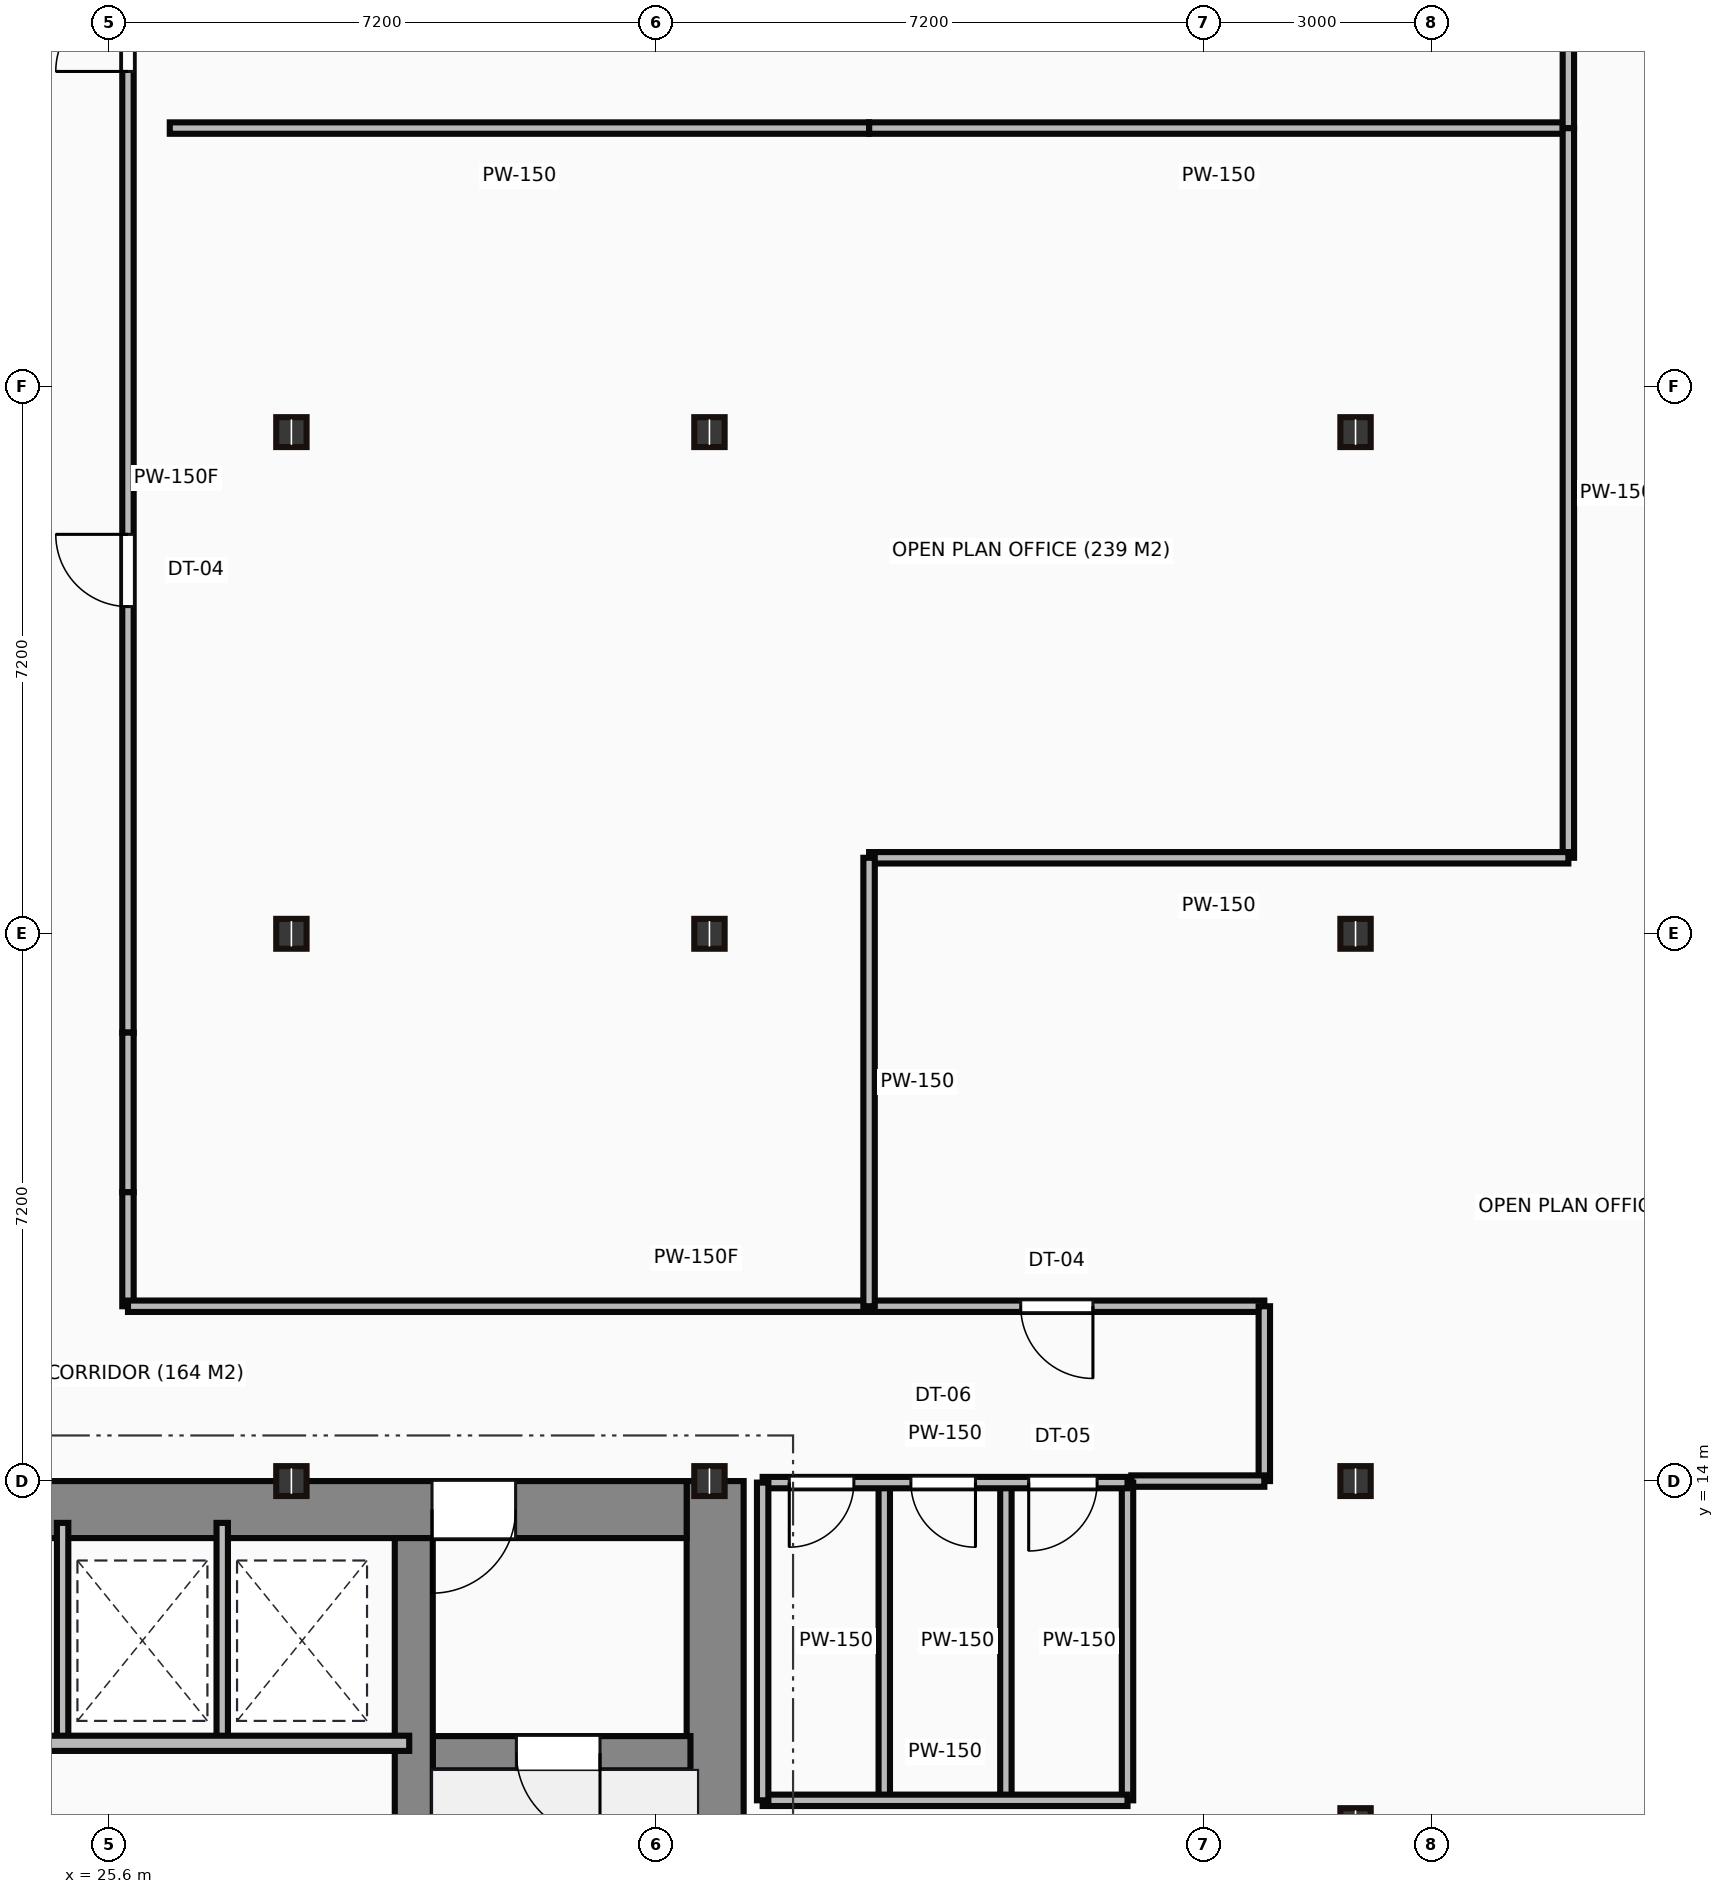
"""IFC4 building model, lengths in metres.
Left out: names, types, materials, properties, quantities, classifications, styles, units other than length and angle.
Written with IfcOpenShell. Run it as: python <this file> out.ifc"""

import sys

from ifc_helpers import new_model, si_unit, direction, frame, frame_2d, origin, origin_2d, place, context, subcontext, project, spatial, rectangle, i_section, extrude, source, transform, mapped, element, fill, save


model = new_model("IFC4")
c1 = context("Model", 3, precision=1e-05, world=origin(), true_north=direction((0.0, 1.0)))
c2 = subcontext(c1, "Body", "Model", "MODEL_VIEW")
j1 = project(units=[si_unit("LENGTHUNIT", "METRE"), si_unit("PLANEANGLEUNIT", "RADIAN")], contexts=[c1])
p1 = place(None, origin())
s1 = spatial("IfcSite", under=j1, at=p1, CompositionType="ELEMENT")
p2 = place(p1, origin())
s2 = spatial("IfcBuilding", under=s1, at=p2, CompositionType="ELEMENT")
p3 = place(p2, frame((0.0, 0.0, 132.45)))
s3 = spatial("IfcBuildingStorey", under=s2, at=p3, CompositionType="ELEMENT", Elevation=132.45)
m1 = source(origin(), c2, "Body", "SweptSolid", [
    extrude(rectangle(XDim=13.1, YDim=0.75, at=frame_2d((6.55, 0.0))), origin(), (0.0, 0.0, 1.0), 3.65),
])
p4 = place(p3, frame((33.575, 0.9, 0.0), z_axis=(0.0, 0.0, 1.0), x_axis=(0.0, 1.0, 0.0)))
e1 = element("IfcWall", 1, at=p4, inside=s3, PredefinedType="SHEAR", context=c2, shape_type="MappedRepresentation", body=[
    mapped(m1, transform((0.0, 0.0, 0.0))),
])
m2 = source(origin(), c2, "Body", "SweptSolid", [
    extrude(rectangle(XDim=12.6, YDim=0.75, at=frame_2d((6.3, 0.0))), origin(), (0.0, 0.0, 1.0), 3.65),
])
p5 = place(p3, frame((20.6, 13.625, 0.0), z_axis=(0.0, 0.0, 1.0), x_axis=(1.0, 0.0, 0.0)))
e2 = element("IfcWall", 2, at=p5, inside=s3, PredefinedType="SHEAR", context=c2, shape_type="MappedRepresentation", body=[
    mapped(m2, transform((0.0, 0.0, 0.0))),
])
p6 = place(p5, frame((9.25, 0.0, 0.0)))
e3 = element("IfcOpeningElement", 3, at=p6, cuts=e2, PredefinedType="OPENING", context=c2, shape_type="SweptSolid", body=[
    extrude(rectangle(XDim=1.1, YDim=2.15, at=frame_2d((0.55, 1.075))), frame((0.0, 0.385, 0.0), z_axis=(0.0, -1.0, 0.0), x_axis=(1.0, 0.0, 0.0)), (0.0, 0.0, 1.0), 0.77),
])
m3 = source(origin(), c2, "Body", "SweptSolid", [
    extrude(rectangle(XDim=12.35, YDim=0.5, at=frame_2d((6.175, 0.0))), origin(), (0.0, 0.0, 1.0), 3.65),
])
p7 = place(p3, frame((29.61, 0.9, 0.0), z_axis=(0.0, 0.0, 1.0), x_axis=(0.0, 1.0, 0.0)))
e4 = element("IfcWall", 4, at=p7, inside=s3, PredefinedType="SHEAR", context=c2, shape_type="MappedRepresentation", body=[
    mapped(m3, transform((0.0, 0.0, 0.0))),
])
m4 = source(origin(), c2, "Body", "SweptSolid", [
    extrude(rectangle(XDim=3.39, YDim=0.45, at=frame_2d((1.695, 0.0))), origin(), (0.0, 0.0, 1.0), 3.65),
])
p8 = place(p3, frame((29.86, 10.42, 0.0), z_axis=(0.0, 0.0, 1.0), x_axis=(1.0, 0.0, 0.0)))
e5 = element("IfcWall", 5, at=p8, inside=s3, PredefinedType="SHEAR", context=c2, shape_type="MappedRepresentation", body=[
    mapped(m4, transform((0.0, 0.0, 0.0))),
])
p9 = place(p8, frame((1.1, 0.0, 0.0)))
e6 = element("IfcOpeningElement", 6, at=p9, cuts=e5, PredefinedType="OPENING", context=c2, shape_type="SweptSolid", body=[
    extrude(rectangle(XDim=1.1, YDim=2.15, at=frame_2d((0.55, 1.075))), frame((0.0, 0.235, 0.0), z_axis=(0.0, -1.0, 0.0), x_axis=(1.0, 0.0, 0.0)), (0.0, 0.0, 1.0), 0.47),
])
m5 = source(origin(), c2, "Body", "SweptSolid", [
    extrude(i_section(OverallWidth=0.399, OverallDepth=0.393, WebThickness=0.023, FlangeThickness=0.037, at=origin_2d()), origin(), (0.0, 0.0, 1.0), 3.65),
])
for number, where, z_axis, x_axis in (
    (7, (28.0, 14.0, 0.0), (0.0, 0.0, 1.0), (1.0, 0.0, 0.0)),
    (8, (28.0, 21.2, 0.0), (0.0, 0.0, 1.0), (1.0, 0.0, 0.0)),
    (9, (28.0, 27.8, 0.0), (0.0, 0.0, 1.0), (1.0, 0.0, 0.0)),
    (10, (33.5, 14.0, 0.0), (0.0, 0.0, 1.0), (1.0, 0.0, 0.0)),
    (11, (33.5, 21.2, 0.0), (0.0, 0.0, 1.0), (1.0, 0.0, 0.0)),
    (12, (33.5, 27.8, 0.0), (0.0, 0.0, 1.0), (1.0, 0.0, 0.0)),
    (13, (42.0, 9.5, 0.0), (0.0, 0.0, 1.0), (1.0, 0.0, 0.0)),
    (14, (42.0, 14.0, 0.0), (0.0, 0.0, 1.0), (1.0, 0.0, 0.0)),
    (15, (42.0, 21.2, 0.0), (0.0, 0.0, 1.0), (1.0, 0.0, 0.0)),
    (16, (42.0, 27.8, 0.0), (0.0, 0.0, 1.0), (1.0, 0.0, 0.0)),
):
    element("IfcColumn", number, at=place(p3, frame(where, z_axis=z_axis, x_axis=x_axis)), inside=s3, PredefinedType="COLUMN", context=c2, shape_type="MappedRepresentation", body=[
        mapped(m5, transform((0.0, 0.0, 0.0))),
    ])
m6 = source(origin(), c2, "Body", "SweptSolid", [
    extrude(rectangle(XDim=8.8, YDim=0.2, at=frame_2d((4.4, 0.0))), origin(), (0.0, 0.0, 1.0), 3.35),
])
p10 = place(p3, frame((20.75, 10.55, 0.0), z_axis=(0.0, 0.0, 1.0), x_axis=(1.0, 0.0, 0.0)))
e17 = element("IfcWall", 17, at=p10, inside=s3, PredefinedType="PARTITIONING", context=c2, shape_type="MappedRepresentation", body=[
    mapped(m6, transform((0.0, 0.0, 0.0))),
])
m7 = source(origin(), c2, "Body", "SweptSolid", [
    extrude(rectangle(XDim=2.85, YDim=0.15, at=frame_2d((1.425, 0.0))), origin(), (0.0, 0.0, 1.0), 3.35),
])
for number, where, z_axis, x_axis in (
    (18, (24.99, 10.6, 0.0), (0.0, 0.0, 1.0), (0.0, 1.0, 0.0)),
    (19, (27.09, 10.6, 0.0), (0.0, 0.0, 1.0), (0.0, 1.0, 0.0)),
):
    element("IfcWall", number, at=place(p3, frame(where, z_axis=z_axis, x_axis=x_axis)), inside=s3, PredefinedType="PARTITIONING", context=c2, shape_type="MappedRepresentation", body=[
        mapped(m7, transform((0.0, 0.0, 0.0))),
    ])
m8 = source(origin(), c2, "Body", "SweptSolid", [
    extrude(rectangle(XDim=4.8, YDim=0.15, at=frame_2d((2.4, 0.0))), origin(), (0.0, 0.0, 1.0), 2.652),
])
p11 = place(p3, frame((34.2, 13.98, 0.0), z_axis=(0.0, 0.0, 1.0), x_axis=(1.0, 0.0, 0.0)))
e20 = element("IfcWall", 20, at=p11, inside=s3, PredefinedType="PARTITIONING", context=c2, shape_type="MappedRepresentation", body=[
    mapped(m8, transform((0.0, 0.0, 0.0))),
])
p12 = place(p11, frame((0.35, 0.0, 0.0)))
e21 = element("IfcOpeningElement", 21, at=p12, cuts=e20, PredefinedType="OPENING", context=c2, shape_type="SweptSolid", body=[
    extrude(rectangle(XDim=0.85, YDim=2.1, at=frame_2d((0.425, 1.05))), frame((0.0, 0.085, 0.0), z_axis=(0.0, -1.0, 0.0), x_axis=(1.0, 0.0, 0.0)), (0.0, 0.0, 1.0), 0.17),
])
p13 = place(p11, frame((1.95, 0.0, 0.0)))
e22 = element("IfcOpeningElement", 22, at=p13, cuts=e20, PredefinedType="OPENING", context=c2, shape_type="SweptSolid", body=[
    extrude(rectangle(XDim=0.85, YDim=2.1, at=frame_2d((0.425, 1.05))), frame((0.0, 0.085, 0.0), z_axis=(0.0, -1.0, 0.0), x_axis=(1.0, 0.0, 0.0)), (0.0, 0.0, 1.0), 0.17),
])
p14 = place(p11, frame((3.5, 0.0, 0.0)))
e23 = element("IfcOpeningElement", 23, at=p14, cuts=e20, PredefinedType="OPENING", context=c2, shape_type="SweptSolid", body=[
    extrude(rectangle(XDim=0.9, YDim=2.1, at=frame_2d((0.45, 1.05))), frame((0.0, 0.085, 0.0), z_axis=(0.0, -1.0, 0.0), x_axis=(1.0, 0.0, 0.0)), (0.0, 0.0, 1.0), 0.17),
])
m9 = source(origin(), c2, "Body", "SweptSolid", [
    extrude(rectangle(XDim=4.8, YDim=0.15, at=frame_2d((2.4, 0.0))), origin(), (0.0, 0.0, 1.0), 3.35),
])
p15 = place(p3, frame((34.2, 9.8, 0.0), z_axis=(0.0, 0.0, 1.0), x_axis=(1.0, 0.0, 0.0)))
e24 = element("IfcWall", 24, at=p15, inside=s3, PredefinedType="PARTITIONING", context=c2, shape_type="MappedRepresentation", body=[
    mapped(m9, transform((0.0, 0.0, 0.0))),
])
m10 = source(origin(), c2, "Body", "SweptSolid", [
    extrude(rectangle(XDim=4.18, YDim=0.15, at=frame_2d((2.09, 0.0))), origin(), (0.0, 0.0, 1.0), 3.35),
])
for number, where, z_axis, x_axis in (
    (25, (39.0, 9.8, 0.0), (0.0, 0.0, 1.0), (0.0, 1.0, 0.0)),
    (26, (34.2, 9.8, 0.0), (0.0, 0.0, 1.0), (0.0, 1.0, 0.0)),
    (27, (35.8, 9.8, 0.0), (0.0, 0.0, 1.0), (0.0, 1.0, 0.0)),
    (28, (37.4, 9.8, 0.0), (0.0, 0.0, 1.0), (0.0, 1.0, 0.0)),
):
    element("IfcWall", number, at=place(p3, frame(where, z_axis=z_axis, x_axis=x_axis)), inside=s3, PredefinedType="PARTITIONING", context=c2, shape_type="MappedRepresentation", body=[
        mapped(m10, transform((0.0, 0.0, 0.0))),
    ])
m11 = source(origin(), c2, "Body", "SweptSolid", [
    extrude(rectangle(XDim=14.6, YDim=0.15, at=frame_2d((7.3, 0.0))), origin(), (0.0, 0.0, 1.0), 3.35),
])
p16 = place(p3, frame((25.85, 34.5, 0.0), z_axis=(0.0, 0.0, 1.0), x_axis=(0.0, -1.0, 0.0)))
e29 = element("IfcWall", 29, at=p16, inside=s3, PredefinedType="PARTITIONING", context=c2, shape_type="MappedRepresentation", body=[
    mapped(m11, transform((0.0, 0.0, 0.0))),
])
p17 = place(p16, frame((1.005, 0.0, 0.0)))
e30 = element("IfcOpeningElement", 30, at=p17, cuts=e29, PredefinedType="OPENING", context=c2, shape_type="SweptSolid", body=[
    extrude(rectangle(XDim=0.95, YDim=2.15, at=frame_2d((0.475, 1.075))), frame((0.0, 0.085, 0.0), z_axis=(0.0, -1.0, 0.0), x_axis=(1.0, 0.0, 0.0)), (0.0, 0.0, 1.0), 0.17),
])
p18 = place(p16, frame((8.045, 0.0, 0.0)))
e31 = element("IfcOpeningElement", 31, at=p18, cuts=e29, PredefinedType="OPENING", context=c2, shape_type="SweptSolid", body=[
    extrude(rectangle(XDim=0.95, YDim=2.15, at=frame_2d((0.475, 1.075))), frame((0.0, 0.085, 0.0), z_axis=(0.0, -1.0, 0.0), x_axis=(1.0, 0.0, 0.0)), (0.0, 0.0, 1.0), 0.17),
])
m12 = source(origin(), c2, "Body", "SweptSolid", [
    extrude(rectangle(XDim=2.1, YDim=0.15, at=frame_2d((1.05, 0.0))), origin(), (0.0, 0.0, 1.0), 3.35),
])
p19 = place(p3, frame((25.85, 19.9, 0.0), z_axis=(0.0, 0.0, 1.0), x_axis=(0.0, -1.0, 0.0)))
e32 = element("IfcWall", 32, at=p19, inside=s3, PredefinedType="PARTITIONING", context=c2, shape_type="MappedRepresentation", body=[
    mapped(m12, transform((0.0, 0.0, 0.0))),
])
m13 = source(origin(), c2, "Body", "SweptSolid", [
    extrude(rectangle(XDim=1.5, YDim=0.15, at=frame_2d((0.75, 0.0))), origin(), (0.0, 0.0, 1.0), 3.35),
])
p20 = place(p3, frame((25.85, 17.8, 0.0), z_axis=(0.0, 0.0, 1.0), x_axis=(0.0, -1.0, 0.0)))
e33 = element("IfcWall", 33, at=p20, inside=s3, PredefinedType="PARTITIONING", context=c2, shape_type="MappedRepresentation", body=[
    mapped(m13, transform((0.0, 0.0, 0.0))),
])
m14 = source(origin(), c2, "Body", "SweptSolid", [
    extrude(rectangle(XDim=14.95, YDim=0.15, at=frame_2d((7.475, 0.0))), origin(), (0.0, 0.0, 1.0), 3.35),
])
p21 = place(p3, frame((25.85, 16.3, 0.0), z_axis=(0.0, 0.0, 1.0), x_axis=(1.0, 0.0, 0.0)))
e34 = element("IfcWall", 34, at=p21, inside=s3, PredefinedType="PARTITIONING", context=c2, shape_type="MappedRepresentation", body=[
    mapped(m14, transform((0.0, 0.0, 0.0))),
])
p22 = place(p21, frame((11.745, 0.0, 0.0)))
e35 = element("IfcOpeningElement", 35, at=p22, cuts=e34, PredefinedType="OPENING", context=c2, shape_type="SweptSolid", body=[
    extrude(rectangle(XDim=0.95, YDim=2.15, at=frame_2d((0.475, 1.075))), frame((0.0, 0.085, 0.0), z_axis=(0.0, -1.0, 0.0), x_axis=(1.0, 0.0, 0.0)), (0.0, 0.0, 1.0), 0.17),
])
m15 = source(origin(), c2, "Body", "SweptSolid", [
    extrude(rectangle(XDim=2.3, YDim=0.15, at=frame_2d((1.15, 0.0))), origin(), (0.0, 0.0, 1.0), 3.35),
])
p23 = place(p3, frame((40.8, 16.3, 0.0), z_axis=(0.0, 0.0, 1.0), x_axis=(0.0, -1.0, 0.0)))
e36 = element("IfcWall", 36, at=p23, inside=s3, PredefinedType="PARTITIONING", context=c2, shape_type="MappedRepresentation", body=[
    mapped(m15, transform((0.0, 0.0, 0.0))),
])
m16 = source(origin(), c2, "Body", "SweptSolid", [
    extrude(rectangle(XDim=1.75, YDim=0.15, at=frame_2d((0.875, 0.0))), origin(), (0.0, 0.0, 1.0), 2.652),
])
p24 = place(p3, frame((40.8, 14.0, 0.0), z_axis=(0.0, 0.0, 1.0), x_axis=(-1.0, 0.0, 0.0)))
e37 = element("IfcWall", 37, at=p24, inside=s3, PredefinedType="PARTITIONING", context=c2, shape_type="MappedRepresentation", body=[
    mapped(m16, transform((0.0, 0.0, 0.0))),
])
m17 = source(origin(), c2, "Body", "SweptSolid", [
    extrude(rectangle(XDim=9.2, YDim=0.15, at=frame_2d((4.6, 0.0))), origin(), (0.0, 0.0, 1.0), 3.35),
])
p25 = place(p3, frame((44.8, 31.8, 0.0), z_axis=(0.0, 0.0, 1.0), x_axis=(-1.0, 0.0, 0.0)))
e38 = element("IfcWall", 38, at=p25, inside=s3, PredefinedType="PARTITIONING", context=c2, shape_type="MappedRepresentation", body=[
    mapped(m17, transform((0.0, 0.0, 0.0))),
])
m18 = source(origin(), c2, "Body", "SweptSolid", [
    extrude(rectangle(XDim=9.2, YDim=0.15, at=frame_2d((4.6, 0.0))), origin(), (0.0, 0.0, 1.0), 3.35),
])
p26 = place(p3, frame((35.6, 31.8, 0.0), z_axis=(0.0, 0.0, 1.0), x_axis=(-1.0, 0.0, 0.0)))
e39 = element("IfcWall", 39, at=p26, inside=s3, PredefinedType="PARTITIONING", context=c2, shape_type="MappedRepresentation", body=[
    mapped(m18, transform((0.0, 0.0, 0.0))),
])
m19 = source(origin(), c2, "Body", "SweptSolid", [
    extrude(rectangle(XDim=9.6, YDim=0.15, at=frame_2d((4.8, 0.0))), origin(), (0.0, 0.0, 1.0), 3.35),
])
p27 = place(p3, frame((44.8, 31.8, 0.0), z_axis=(0.0, 0.0, 1.0), x_axis=(0.0, -1.0, 0.0)))
e40 = element("IfcWall", 40, at=p27, inside=s3, PredefinedType="PARTITIONING", context=c2, shape_type="MappedRepresentation", body=[
    mapped(m19, transform((0.0, 0.0, 0.0))),
])
p28 = place(p3, frame((44.8, 22.2, 0.0), z_axis=(0.0, 0.0, 1.0), x_axis=(-1.0, 0.0, 0.0)))
e41 = element("IfcWall", 41, at=p28, inside=s3, PredefinedType="PARTITIONING", context=c2, shape_type="MappedRepresentation", body=[
    mapped(m17, transform((0.0, 0.0, 0.0))),
])
m20 = source(origin(), c2, "Body", "SweptSolid", [
    extrude(rectangle(XDim=5.9, YDim=0.15, at=frame_2d((2.95, 0.0))), origin(), (0.0, 0.0, 1.0), 3.35),
])
p29 = place(p3, frame((35.6, 22.2, 0.0), z_axis=(0.0, 0.0, 1.0), x_axis=(0.0, -1.0, 0.0)))
e42 = element("IfcWall", 42, at=p29, inside=s3, PredefinedType="PARTITIONING", context=c2, shape_type="MappedRepresentation", body=[
    mapped(m20, transform((0.0, 0.0, 0.0))),
])
m21 = source(origin(), c2, "Body", "SweptSolid", [
    extrude(rectangle(XDim=8.555, YDim=0.15, at=frame_2d((4.277, 0.0))), origin(), (0.0, 0.0, 1.0), 3.35),
])
p30 = place(p3, frame((44.8, 40.355, 0.0), z_axis=(0.0, 0.0, 1.0), x_axis=(0.0, -1.0, 0.0)))
e43 = element("IfcWall", 43, at=p30, inside=s3, PredefinedType="PARTITIONING", context=c2, shape_type="MappedRepresentation", body=[
    mapped(m21, transform((0.0, 0.0, 0.0))),
])
m22 = source(origin(), c2, "Body", "SweptSolid", [
    extrude(rectangle(XDim=1.1, YDim=2.15, at=frame_2d((0.55, 1.075))), frame((0.0, 0.025, 0.0), z_axis=(0.0, -1.0, 0.0), x_axis=(1.0, 0.0, 0.0)), (0.0, 0.0, 1.0), 0.05),
])
p31 = place(p9, frame((1.1, 0.0, 0.0), z_axis=(0.0, 0.0, 1.0), x_axis=(-1.0, 0.0, 0.0)))
e44 = element("IfcDoor", 44, at=p31, inside=s3, OperationType="SINGLE_SWING_RIGHT", PredefinedType="DOOR", context=c2, shape_type="MappedRepresentation", body=[
    mapped(m22, transform((0.0, 0.0, 0.0))),
])
fill(e6, e44)
p32 = place(p6, origin())
e45 = element("IfcDoor", 45, at=p32, inside=s3, OperationType="SINGLE_SWING_LEFT", PredefinedType="DOOR", context=c2, shape_type="MappedRepresentation", body=[
    mapped(m22, transform((0.0, 0.0, 0.0))),
])
fill(e3, e45)
m23 = source(origin(), c2, "Body", "SweptSolid", [
    extrude(rectangle(XDim=0.85, YDim=2.1, at=frame_2d((0.425, 1.05))), frame((0.0, 0.025, 0.0), z_axis=(0.0, -1.0, 0.0), x_axis=(1.0, 0.0, 0.0)), (0.0, 0.0, 1.0), 0.05),
])
p33 = place(p12, frame((0.85, 0.0, 0.0), z_axis=(0.0, 0.0, 1.0), x_axis=(-1.0, 0.0, 0.0)))
e46 = element("IfcDoor", 46, at=p33, inside=s3, OperationType="SINGLE_SWING_LEFT", PredefinedType="DOOR", context=c2, shape_type="MappedRepresentation", body=[
    mapped(m23, transform((0.0, 0.0, 0.0))),
])
fill(e21, e46)
p34 = place(p13, frame((0.85, 0.0, 0.0), z_axis=(0.0, 0.0, 1.0), x_axis=(-1.0, 0.0, 0.0)))
e47 = element("IfcDoor", 47, at=p34, inside=s3, OperationType="SINGLE_SWING_RIGHT", PredefinedType="DOOR", context=c2, shape_type="MappedRepresentation", body=[
    mapped(m23, transform((0.0, 0.0, 0.0))),
])
fill(e22, e47)
m24 = source(origin(), c2, "Body", "SweptSolid", [
    extrude(rectangle(XDim=0.9, YDim=2.1, at=frame_2d((0.45, 1.05))), frame((0.0, 0.025, 0.0), z_axis=(0.0, -1.0, 0.0), x_axis=(1.0, 0.0, 0.0)), (0.0, 0.0, 1.0), 0.05),
])
p35 = place(p14, frame((0.9, 0.0, 0.0), z_axis=(0.0, 0.0, 1.0), x_axis=(-1.0, 0.0, 0.0)))
e48 = element("IfcDoor", 48, at=p35, inside=s3, OperationType="SINGLE_SWING_LEFT", PredefinedType="DOOR", context=c2, shape_type="MappedRepresentation", body=[
    mapped(m24, transform((0.0, 0.0, 0.0))),
])
fill(e23, e48)
m25 = source(origin(), c2, "Body", "SweptSolid", [
    extrude(rectangle(XDim=0.95, YDim=2.15, at=frame_2d((0.475, 1.075))), frame((0.0, 0.025, 0.0), z_axis=(0.0, -1.0, 0.0), x_axis=(1.0, 0.0, 0.0)), (0.0, 0.0, 1.0), 0.05),
])
p36 = place(p17, origin())
e49 = element("IfcDoor", 49, at=p36, inside=s3, OperationType="SINGLE_SWING_RIGHT", PredefinedType="DOOR", context=c2, shape_type="MappedRepresentation", body=[
    mapped(m25, transform((0.0, 0.0, 0.0))),
])
fill(e30, e49)
p37 = place(p18, origin())
e50 = element("IfcDoor", 50, at=p37, inside=s3, OperationType="SINGLE_SWING_LEFT", PredefinedType="DOOR", context=c2, shape_type="MappedRepresentation", body=[
    mapped(m25, transform((0.0, 0.0, 0.0))),
])
fill(e31, e50)
p38 = place(p22, origin())
e51 = element("IfcDoor", 51, at=p38, inside=s3, OperationType="SINGLE_SWING_RIGHT", PredefinedType="DOOR", context=c2, shape_type="MappedRepresentation", body=[
    mapped(m25, transform((0.0, 0.0, 0.0))),
])
fill(e35, e51)
save(model, sys.argv[1])
